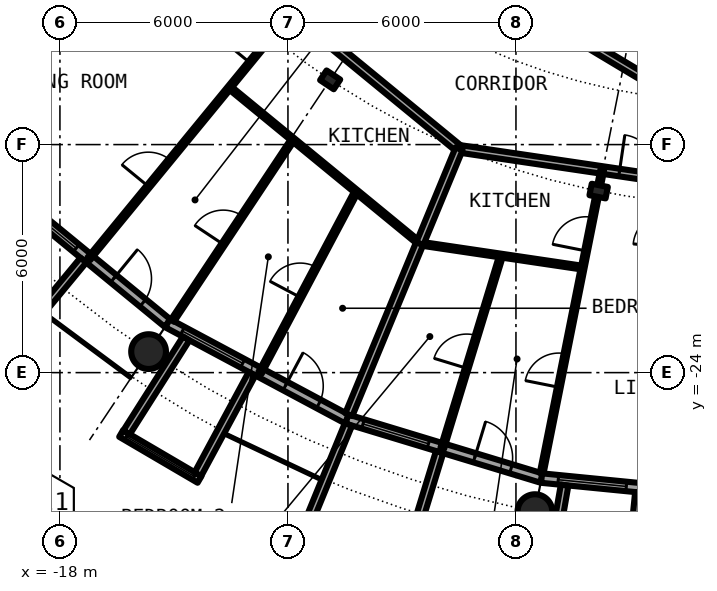
"""IFC4 building model, lengths in metres.
Left out: names, types, materials, properties, quantities, classifications, styles, units other than length and angle.
Written with IfcOpenShell. Run it as: python <this file> out.ifc"""

import sys

from ifc_helpers import new_model, si_unit, direction, frame, frame_2d, origin, origin_2d, place, context, subcontext, project, spatial, rectangle, circle, hollow_circle, i_section, extrude, element, fill, save


model = new_model("IFC4")
c1 = context("Model", 3, precision=1e-05, world=origin(), true_north=direction((0.0, 1.0)))
c2 = subcontext(c1, "Body", "Model", "MODEL_VIEW")
j1 = project(units=[si_unit("LENGTHUNIT", "METRE"), si_unit("PLANEANGLEUNIT", "RADIAN")], contexts=[c1])
p1 = place(None, origin())
s1 = spatial("IfcSite", under=j1, at=p1, CompositionType="ELEMENT")
p2 = place(p1, origin())
s2 = spatial("IfcBuilding", under=s1, at=p2, CompositionType="ELEMENT")
p3 = place(p2, frame((0.0, 0.0, 129.95)))
s3 = spatial("IfcBuildingStorey", under=s2, at=p3, CompositionType="ELEMENT", Elevation=129.95)
for number, where, z_axis, x_axis in (
    (1, (-15.667, -23.448, 0.0), (0.0, 0.0, 1.0), (1.0, 0.0, 0.0)),
    (2, (-5.501, -27.658, 0.0), (0.0, 0.0, 1.0), (1.0, 0.0, 0.0)),
):
    element("IfcColumn", number, at=place(p3, frame(where, z_axis=z_axis, x_axis=x_axis)), inside=s3, PredefinedType="COLUMN", context=c2, shape_type="SweptSolid", body=[
        extrude(hollow_circle(Radius=0.457, WallThickness=0.04, at=origin_2d()), origin(), (0.0, 0.0, 1.0), 3.05),
    ])
for number, where, z_axis, x_axis in (
    (3, (-10.889, -16.297, 0.0), (0.0, 0.0, 1.0), (-0.556, -0.831, 0.0)),
    (4, (-3.824, -19.223, 0.0), (0.0, 0.0, 1.0), (-0.195, -0.981, 0.0)),
):
    element("IfcColumn", number, at=place(p3, frame(where, z_axis=z_axis, x_axis=x_axis)), inside=s3, PredefinedType="COLUMN", context=c2, shape_type="SweptSolid", body=[
        extrude(i_section(OverallWidth=0.307, OverallDepth=0.432, WebThickness=0.021, FlangeThickness=0.04, FilletRadius=0.027, at=origin_2d()), origin(), (0.0, 0.0, 1.0), 3.05),
    ])
p4 = place(p3, frame((-19.304, -19.304, 0.0), z_axis=(0.0, 0.0, 1.0), x_axis=(0.773019449054, -0.634382322723, 0.0)))
e5 = element("IfcWall", 5, at=p4, inside=s3, PredefinedType="SOLIDWALL", context=c2, shape_type="SweptSolid", body=[
    extrude(rectangle(XDim=5.352, YDim=0.25, at=frame_2d((2.676, 0.0))), origin(), (0.0, 0.0, 1.0), 2.7),
])
p5 = place(p4, frame((0.441, 0.0, 0.3)))
e6 = element("IfcOpeningElement", 6, at=p5, cuts=e5, PredefinedType="OPENING", context=c2, shape_type="SweptSolid", body=[
    extrude(rectangle(XDim=1.8, YDim=2.1, at=frame_2d((0.9, 1.05))), frame((0.0, 0.135, 0.0), z_axis=(0.0, -1.0, 0.0), x_axis=(1.0, 0.0, 0.0)), (0.0, 0.0, 1.0), 0.27),
])
p6 = place(p4, frame((3.51, 0.0, 0.0)))
e7 = element("IfcOpeningElement", 7, at=p6, cuts=e5, PredefinedType="OPENING", context=c2, shape_type="SweptSolid", body=[
    extrude(rectangle(XDim=1.0, YDim=2.2, at=frame_2d((0.5, 1.1))), frame((0.0, 0.135, 0.0), z_axis=(0.0, -1.0, 0.0), x_axis=(1.0, 0.0, 0.0)), (0.0, 0.0, 1.0), 0.27),
])
p7 = place(p3, frame((-17.384, -21.041, -0.03), z_axis=(0.0, 0.0, 1.0), x_axis=(-0.63709551667, -0.770784861449, 0.0)))
e8 = element("IfcWall", 8, at=p7, inside=s3, PredefinedType="SOLIDWALL", context=c2, shape_type="SweptSolid", body=[
    extrude(rectangle(XDim=3.006, YDim=0.2, at=frame_2d((1.503, 0.0))), origin(), (0.0, 0.0, 1.0), 2.73),
])
p8 = place(p3, frame((-15.167, -22.699, 0.0), z_axis=(0.0, 0.0, 1.0), x_axis=(0.881915646801, -0.471407246368, 0.0)))
e9 = element("IfcWall", 9, at=p8, inside=s3, PredefinedType="SOLIDWALL", context=c2, shape_type="SweptSolid", body=[
    extrude(rectangle(XDim=5.352, YDim=0.25, at=frame_2d((2.676, 0.0))), origin(), (0.0, 0.0, 1.0), 2.7),
])
p9 = place(p8, frame((0.441, 0.0, 0.3)))
e10 = element("IfcOpeningElement", 10, at=p9, cuts=e9, PredefinedType="OPENING", context=c2, shape_type="SweptSolid", body=[
    extrude(rectangle(XDim=1.8, YDim=2.1, at=frame_2d((0.9, 1.05))), frame((0.0, 0.135, 0.0), z_axis=(0.0, -1.0, 0.0), x_axis=(1.0, 0.0, 0.0)), (0.0, 0.0, 1.0), 0.27),
])
p10 = place(p8, frame((3.51, 0.0, 0.0)))
e11 = element("IfcOpeningElement", 11, at=p10, cuts=e9, PredefinedType="OPENING", context=c2, shape_type="SweptSolid", body=[
    extrude(rectangle(XDim=1.0, YDim=2.2, at=frame_2d((0.5, 1.1))), frame((0.0, 0.135, 0.0), z_axis=(0.0, -1.0, 0.0), x_axis=(1.0, 0.0, 0.0)), (0.0, 0.0, 1.0), 0.27),
])
p11 = place(p3, frame((-16.39, -25.603, -0.03), z_axis=(0.0, 0.0, 1.0), x_axis=(0.862762477128, -0.505609442218, 0.0)))
e12 = element("IfcWall", 12, at=p11, inside=s3, PredefinedType="SOLIDWALL", context=c2, shape_type="SweptSolid", body=[
    extrude(rectangle(XDim=2.391, YDim=0.2, at=frame_2d((1.196, 0.0))), origin(), (0.0, 0.0, 1.0), 2.73),
])
p12 = place(p11, frame((0.156, 0.0, 0.33)))
e13 = element("IfcOpeningElement", 13, at=p12, cuts=e12, PredefinedType="OPENING", context=c2, shape_type="SweptSolid", body=[
    extrude(circle(Radius=1.04, at=frame_2d((1.04, 1.04))), frame((0.0, 0.11, 0.0), z_axis=(0.0, -1.0, 0.0), x_axis=(1.0, 0.0, 0.0)), (0.0, 0.0, 1.0), 0.22),
])
p13 = place(p3, frame((-14.678, -23.102, -0.03), z_axis=(0.0, 0.0, 1.0), x_axis=(-0.536001536573, -0.844217005746, 0.0)))
e14 = element("IfcWall", 14, at=p13, inside=s3, PredefinedType="SOLIDWALL", context=c2, shape_type="SweptSolid", body=[
    extrude(rectangle(XDim=2.929, YDim=0.2, at=frame_2d((1.465, 0.0))), origin(), (0.0, 0.0, 1.0), 2.73),
])
p14 = place(p3, frame((-12.945, -24.029, -0.03), z_axis=(0.0, 0.0, 1.0), x_axis=(-0.474424310775, -0.88029629861, 0.0)))
e15 = element("IfcWall", 15, at=p14, inside=s3, PredefinedType="SOLIDWALL", context=c2, shape_type="SweptSolid", body=[
    extrude(rectangle(XDim=3.006, YDim=0.2, at=frame_2d((1.503, 0.0))), origin(), (0.0, 0.0, 1.0), 2.73),
])
p15 = place(p3, frame((-10.447, -25.222, 0.0), z_axis=(0.0, 0.0, 1.0), x_axis=(0.956965678721, -0.290201119486, 0.0)))
e16 = element("IfcWall", 16, at=p15, inside=s3, PredefinedType="SOLIDWALL", context=c2, shape_type="SweptSolid", body=[
    extrude(rectangle(XDim=5.351, YDim=0.25, at=frame_2d((2.676, 0.0))), origin(), (0.0, 0.0, 1.0), 2.7),
])
p16 = place(p15, frame((0.441, 0.0, 0.3)))
e17 = element("IfcOpeningElement", 17, at=p16, cuts=e16, PredefinedType="OPENING", context=c2, shape_type="SweptSolid", body=[
    extrude(rectangle(XDim=1.8, YDim=2.1, at=frame_2d((0.9, 1.05))), frame((0.0, 0.135, 0.0), z_axis=(0.0, -1.0, 0.0), x_axis=(1.0, 0.0, 0.0)), (0.0, 0.0, 1.0), 0.27),
])
p17 = place(p15, frame((3.51, 0.0, 0.0)))
e18 = element("IfcOpeningElement", 18, at=p17, cuts=e16, PredefinedType="OPENING", context=c2, shape_type="SweptSolid", body=[
    extrude(rectangle(XDim=1.0, YDim=2.2, at=frame_2d((0.5, 1.1))), frame((0.0, 0.135, 0.0), z_axis=(0.0, -1.0, 0.0), x_axis=(1.0, 0.0, 0.0)), (0.0, 0.0, 1.0), 0.27),
])
p18 = place(p3, frame((-10.409, -25.364, -0.03), z_axis=(0.0, 0.0, 1.0), x_axis=(-0.379509886562, -0.925187681501, 0.0)))
e19 = element("IfcWall", 19, at=p18, inside=s3, PredefinedType="SOLIDWALL", context=c2, shape_type="SweptSolid", body=[
    extrude(rectangle(XDim=2.883, YDim=0.2, at=frame_2d((1.441, 0.0))), origin(), (0.0, 0.0, 1.0), 2.73),
])
p19 = place(p3, frame((-8.009, -26.092, -0.03), z_axis=(0.0, 0.0, 1.0), x_axis=(-0.293406695073, -0.955987715029, 0.0)))
e20 = element("IfcWall", 20, at=p19, inside=s3, PredefinedType="SOLIDWALL", context=c2, shape_type="SweptSolid", body=[
    extrude(rectangle(XDim=3.006, YDim=0.2, at=frame_2d((1.503, 0.0))), origin(), (0.0, 0.0, 1.0), 2.73),
])
p20 = place(p3, frame((-5.326, -26.775, 0.0), z_axis=(0.0, 0.0, 1.0), x_axis=(0.995173996315, -0.098126026407, 0.0)))
e21 = element("IfcWall", 21, at=p20, inside=s3, PredefinedType="SOLIDWALL", context=c2, shape_type="SweptSolid", body=[
    extrude(rectangle(XDim=5.352, YDim=0.25, at=frame_2d((2.676, 0.0))), origin(), (0.0, 0.0, 1.0), 2.7),
])
p21 = place(p20, frame((0.441, 0.0, 0.3)))
e22 = element("IfcOpeningElement", 22, at=p21, cuts=e21, PredefinedType="OPENING", context=c2, shape_type="SweptSolid", body=[
    extrude(rectangle(XDim=1.8, YDim=2.1, at=frame_2d((0.9, 1.05))), frame((0.0, 0.135, 0.0), z_axis=(0.0, -1.0, 0.0), x_axis=(1.0, 0.0, 0.0)), (0.0, 0.0, 1.0), 0.27),
])
p22 = place(p20, frame((3.51, 0.0, 0.0)))
e23 = element("IfcOpeningElement", 23, at=p22, cuts=e21, PredefinedType="OPENING", context=c2, shape_type="SweptSolid", body=[
    extrude(rectangle(XDim=1.0, YDim=2.2, at=frame_2d((0.5, 1.1))), frame((0.0, 0.135, 0.0), z_axis=(0.0, -1.0, 0.0), x_axis=(1.0, 0.0, 0.0)), (0.0, 0.0, 1.0), 0.27),
])
p23 = place(p3, frame((-4.72, -26.961, -0.03), z_axis=(0.0, 0.0, 1.0), x_axis=(-0.172463232037, -0.98501595601, 0.0)))
e24 = element("IfcWall", 24, at=p23, inside=s3, PredefinedType="SOLIDWALL", context=c2, shape_type="SweptSolid", body=[
    extrude(rectangle(XDim=2.929, YDim=0.2, at=frame_2d((1.464, 0.0))), origin(), (0.0, 0.0, 1.0), 2.73),
])
p24 = place(p3, frame((-2.764, -27.153, -0.03), z_axis=(0.0, 0.0, 1.0), x_axis=(-0.101505487237, -0.994834979311, 0.0)))
e25 = element("IfcWall", 25, at=p24, inside=s3, PredefinedType="SOLIDWALL", context=c2, shape_type="SweptSolid", body=[
    extrude(rectangle(XDim=3.007, YDim=0.2, at=frame_2d((1.503, 0.0))), origin(), (0.0, 0.0, 1.0), 2.73),
])
p25 = place(p3, frame((-8.534, -20.603, 0.0), z_axis=(0.0, 0.0, 1.0), x_axis=(0.989178348771, -0.146718077695, 0.0)))
e26 = element("IfcWall", 26, at=p25, inside=s3, PredefinedType="PARTITIONING", context=c2, shape_type="SweptSolid", body=[
    extrude(rectangle(XDim=4.335, YDim=0.1, at=frame_2d((2.167, 0.0))), origin(), (0.0, 0.0, 1.0), 2.7),
])
p26 = place(p3, frame((-13.538, -16.496, 0.0), z_axis=(0.0, 0.0, 1.0), x_axis=(0.773000340237, -0.634405606843, 0.0)))
e27 = element("IfcWall", 27, at=p26, inside=s3, PredefinedType="PARTITIONING", context=c2, shape_type="SweptSolid", body=[
    extrude(rectangle(XDim=6.474, YDim=0.1, at=frame_2d((3.237, 0.0))), origin(), (0.0, 0.0, 1.0), 2.7),
])
p27 = place(p3, frame((-7.495, -18.111, 0.0), z_axis=(0.0, 0.0, 1.0), x_axis=(0.989215286911, -0.146468823102, 0.0)))
e28 = element("IfcWall", 28, at=p27, inside=s3, PredefinedType="PARTITIONING", context=c2, shape_type="SweptSolid", body=[
    extrude(rectangle(XDim=9.531, YDim=0.2, at=frame_2d((4.766, 0.0))), origin(), (0.0, 0.0, 1.0), 2.39),
])
p28 = place(p27, frame((4.26, 0.0, 0.0)))
e29 = element("IfcOpeningElement", 29, at=p28, cuts=e28, PredefinedType="OPENING", context=c2, shape_type="SweptSolid", body=[
    extrude(rectangle(XDim=1.0, YDim=2.3, at=frame_2d((0.5, 1.15))), frame((0.0, 0.11, 0.0), z_axis=(0.0, -1.0, 0.0), x_axis=(1.0, 0.0, 0.0)), (0.0, 0.0, 1.0), 0.22),
])
p29 = place(p3, frame((-16.173, -10.991, 0.0), z_axis=(0.0, 0.0, 1.0), x_axis=(0.773013989296, -0.634388975591, 0.0)))
e30 = element("IfcWall", 30, at=p29, inside=s3, PredefinedType="PARTITIONING", context=c2, shape_type="SweptSolid", body=[
    extrude(rectangle(XDim=11.219, YDim=0.2, at=frame_2d((5.609, 0.0))), origin(), (0.0, 0.0, 1.0), 2.39),
])
p30 = place(p29, frame((4.089, 0.0, 0.0)))
e31 = element("IfcOpeningElement", 31, at=p30, cuts=e30, PredefinedType="OPENING", context=c2, shape_type="SweptSolid", body=[
    extrude(rectangle(XDim=1.0, YDim=2.3, at=frame_2d((0.5, 1.15))), frame((0.0, 0.11, 0.0), z_axis=(0.0, -1.0, 0.0), x_axis=(1.0, 0.0, 0.0)), (0.0, 0.0, 1.0), 0.22),
])
p31 = place(p3, frame((-12.674, -10.216, 0.0), z_axis=(0.0, 0.0, 1.0), x_axis=(0.857761135463, -0.514048474844, 0.0)))
e32 = element("IfcWall", 32, at=p31, inside=s3, PredefinedType="PARTITIONING", context=c2, shape_type="SweptSolid", body=[
    extrude(rectangle(XDim=12.845, YDim=0.2, at=frame_2d((6.423, 0.0))), origin(), (0.0, 0.0, 1.0), 2.7),
])
p32 = place(p31, frame((7.527, 0.0, 0.0)))
e33 = element("IfcOpeningElement", 33, at=p32, cuts=e32, PredefinedType="OPENING", context=c2, shape_type="SweptSolid", body=[
    extrude(rectangle(XDim=1.0, YDim=2.3, at=frame_2d((0.5, 1.15))), frame((0.0, 0.11, 0.0), z_axis=(0.0, -1.0, 0.0), x_axis=(1.0, 0.0, 0.0)), (0.0, 0.0, 1.0), 0.22),
])
p33 = place(p3, frame((-17.24, -21.007, 0.0), z_axis=(0.0, 0.0, 1.0), x_axis=(0.634396151441, 0.77300810024, 0.0)))
e34 = element("IfcWall", 34, at=p33, inside=s3, PredefinedType="PARTITIONING", context=c2, shape_type="SweptSolid", body=[
    extrude(rectangle(XDim=8.419, YDim=0.1, at=frame_2d((4.209, 0.0))), origin(), (0.0, 0.0, 1.0), 2.7),
])
p34 = place(p33, frame((6.679, 0.0, 0.0)))
e35 = element("IfcOpeningElement", 35, at=p34, cuts=e34, PredefinedType="OPENING", context=c2, shape_type="SweptSolid", body=[
    extrude(rectangle(XDim=0.9, YDim=2.3, at=frame_2d((0.45, 1.15))), frame((0.0, 0.06, 0.0), z_axis=(0.0, -1.0, 0.0), x_axis=(1.0, 0.0, 0.0)), (0.0, 0.0, 1.0), 0.12),
])
p35 = place(p33, frame((2.468, 0.0, 0.0)))
e36 = element("IfcOpeningElement", 36, at=p35, cuts=e34, PredefinedType="OPENING", context=c2, shape_type="SweptSolid", body=[
    extrude(rectangle(XDim=0.9, YDim=2.3, at=frame_2d((0.45, 1.15))), frame((0.0, 0.06, 0.0), z_axis=(0.0, -1.0, 0.0), x_axis=(1.0, 0.0, 0.0)), (0.0, 0.0, 1.0), 0.12),
])
p36 = place(p3, frame((-15.039, -22.634, 0.0), z_axis=(0.0, 0.0, 1.0), x_axis=(0.553440102418, 0.832888980018, 0.0)))
e37 = element("IfcWall", 37, at=p36, inside=s3, PredefinedType="PARTITIONING", context=c2, shape_type="SweptSolid", body=[
    extrude(rectangle(XDim=5.726, YDim=0.1, at=frame_2d((2.863, 0.0))), origin(), (0.0, 0.0, 1.0), 2.7),
])
p37 = place(p36, frame((2.413, 0.0, 0.0)))
e38 = element("IfcOpeningElement", 38, at=p37, cuts=e37, PredefinedType="OPENING", context=c2, shape_type="SweptSolid", body=[
    extrude(rectangle(XDim=0.9, YDim=2.3, at=frame_2d((0.45, 1.15))), frame((0.0, 0.06, 0.0), z_axis=(0.0, -1.0, 0.0), x_axis=(1.0, 0.0, 0.0)), (0.0, 0.0, 1.0), 0.12),
])
p38 = place(p3, frame((-12.734, -24.007, 0.0), z_axis=(0.0, 0.0, 1.0), x_axis=(0.468610030042, 0.883405139075, 0.0)))
e39 = element("IfcWall", 39, at=p38, inside=s3, PredefinedType="PARTITIONING", context=c2, shape_type="SweptSolid", body=[
    extrude(rectangle(XDim=5.403, YDim=0.1, at=frame_2d((2.702, 0.0))), origin(), (0.0, 0.0, 1.0), 2.7),
])
p39 = place(p38, frame((2.252, 0.0, 0.0)))
e40 = element("IfcOpeningElement", 40, at=p39, cuts=e39, PredefinedType="OPENING", context=c2, shape_type="SweptSolid", body=[
    extrude(rectangle(XDim=0.9, YDim=2.3, at=frame_2d((0.45, 1.15))), frame((0.0, 0.06, 0.0), z_axis=(0.0, -1.0, 0.0), x_axis=(1.0, 0.0, 0.0)), (0.0, 0.0, 1.0), 0.12),
])
p40 = place(p3, frame((-10.399, -25.106, 0.0), z_axis=(0.0, 0.0, 1.0), x_axis=(0.382651153718, 0.923892902104, 0.0)))
e41 = element("IfcWall", 41, at=p40, inside=s3, PredefinedType="PARTITIONING", context=c2, shape_type="SweptSolid", body=[
    extrude(rectangle(XDim=4.874, YDim=0.2, at=frame_2d((2.437, 0.0))), origin(), (0.0, 0.0, 1.0), 2.7),
])
p41 = place(p3, frame((-8.529, -20.605, 0.0), z_axis=(0.0, 0.0, 1.0), x_axis=(0.382540781694, 0.923938607452, 0.0)))
e42 = element("IfcWall", 42, at=p41, inside=s3, PredefinedType="PARTITIONING", context=c2, shape_type="SweptSolid", body=[
    extrude(rectangle(XDim=2.7, YDim=0.2, at=frame_2d((1.35, 0.0))), origin(), (0.0, 0.0, 1.0), 2.7),
])
p42 = place(p3, frame((-7.938, -25.99, 0.0), z_axis=(0.0, 0.0, 1.0), x_axis=(0.292081613207, 0.956393397732, 0.0)))
e43 = element("IfcWall", 43, at=p42, inside=s3, PredefinedType="PARTITIONING", context=c2, shape_type="SweptSolid", body=[
    extrude(rectangle(XDim=5.3, YDim=0.1, at=frame_2d((2.65, 0.0))), origin(), (0.0, 0.0, 1.0), 2.7),
])
p43 = place(p42, frame((2.2, 0.0, 0.0)))
e44 = element("IfcOpeningElement", 44, at=p43, cuts=e43, PredefinedType="OPENING", context=c2, shape_type="SweptSolid", body=[
    extrude(rectangle(XDim=0.9, YDim=2.3, at=frame_2d((0.45, 1.15))), frame((0.0, 0.06, 0.0), z_axis=(0.0, -1.0, 0.0), x_axis=(1.0, 0.0, 0.0)), (0.0, 0.0, 1.0), 0.12),
])
p44 = place(p3, frame((-5.324, -26.649, 0.0), z_axis=(0.0, 0.0, 1.0), x_axis=(0.195918370415, 0.980620207896, 0.0)))
e45 = element("IfcWall", 45, at=p44, inside=s3, PredefinedType="PARTITIONING", context=c2, shape_type="SweptSolid", body=[
    extrude(rectangle(XDim=7.36, YDim=0.1, at=frame_2d((3.68, 0.0))), origin(), (0.0, 0.0, 1.0), 2.7),
])
p45 = place(p44, frame((5.966, 0.0, 0.0)))
e46 = element("IfcOpeningElement", 46, at=p45, cuts=e45, PredefinedType="OPENING", context=c2, shape_type="SweptSolid", body=[
    extrude(rectangle(XDim=0.9, YDim=2.3, at=frame_2d((0.45, 1.15))), frame((0.0, 0.06, 0.0), z_axis=(0.0, -1.0, 0.0), x_axis=(1.0, 0.0, 0.0)), (0.0, 0.0, 1.0), 0.12),
])
p46 = place(p44, frame((2.308, 0.0, 0.0)))
e47 = element("IfcOpeningElement", 47, at=p46, cuts=e45, PredefinedType="OPENING", context=c2, shape_type="SweptSolid", body=[
    extrude(rectangle(XDim=0.9, YDim=2.3, at=frame_2d((0.45, 1.15))), frame((0.0, 0.06, 0.0), z_axis=(0.0, -1.0, 0.0), x_axis=(1.0, 0.0, 0.0)), (0.0, 0.0, 1.0), 0.12),
])
p47 = place(p3, frame((-3.797, -19.008, 0.0), z_axis=(0.0, 0.0, 1.0), x_axis=(0.196386856719, 0.980526492507, 0.0)))
e48 = element("IfcWall", 48, at=p47, inside=s3, PredefinedType="PARTITIONING", context=c2, shape_type="SweptSolid", body=[
    extrude(rectangle(XDim=0.347, YDim=0.1, at=frame_2d((0.173, 0.0))), origin(), (0.0, 0.0, 1.0), 2.7),
])
p48 = place(p5, origin())
e49 = element("IfcWindow", 49, at=p48, inside=s3, PartitioningType="SINGLE_PANEL", PredefinedType="WINDOW", context=c2, shape_type="SweptSolid", body=[
    extrude(rectangle(XDim=1.8, YDim=2.1, at=frame_2d((0.9, 1.05))), frame((0.0, 0.03, 0.0), z_axis=(0.0, -1.0, 0.0), x_axis=(1.0, 0.0, 0.0)), (0.0, 0.0, 1.0), 0.06),
])
fill(e6, e49)
p49 = place(p6, origin())
e50 = element("IfcDoor", 50, at=p49, inside=s3, OperationType="SINGLE_SWING_LEFT", PredefinedType="DOOR", context=c2, shape_type="SweptSolid", body=[
    extrude(rectangle(XDim=1.0, YDim=2.2, at=frame_2d((0.5, 1.1))), frame((0.0, 0.025, 0.0), z_axis=(0.0, -1.0, 0.0), x_axis=(1.0, 0.0, 0.0)), (0.0, 0.0, 1.0), 0.05),
])
fill(e7, e50)
p50 = place(p9, origin())
e51 = element("IfcWindow", 51, at=p50, inside=s3, PartitioningType="SINGLE_PANEL", PredefinedType="WINDOW", context=c2, shape_type="SweptSolid", body=[
    extrude(rectangle(XDim=1.8, YDim=2.1, at=frame_2d((0.9, 1.05))), frame((0.0, 0.03, 0.0), z_axis=(0.0, -1.0, 0.0), x_axis=(1.0, 0.0, 0.0)), (0.0, 0.0, 1.0), 0.06),
])
fill(e10, e51)
p51 = place(p12, origin())
e52 = element("IfcWindow", 52, at=p51, inside=s3, PartitioningType="SINGLE_PANEL", PredefinedType="WINDOW", context=c2, shape_type="SweptSolid", body=[
    extrude(circle(Radius=1.04, at=frame_2d((1.04, 1.04))), frame((0.0, 0.03, 0.0), z_axis=(0.0, -1.0, 0.0), x_axis=(1.0, 0.0, 0.0)), (0.0, 0.0, 1.0), 0.06),
])
fill(e13, e52)
p52 = place(p10, origin())
e53 = element("IfcDoor", 53, at=p52, inside=s3, OperationType="SINGLE_SWING_LEFT", PredefinedType="DOOR", context=c2, shape_type="SweptSolid", body=[
    extrude(rectangle(XDim=1.0, YDim=2.2, at=frame_2d((0.5, 1.1))), frame((0.0, 0.025, 0.0), z_axis=(0.0, -1.0, 0.0), x_axis=(1.0, 0.0, 0.0)), (0.0, 0.0, 1.0), 0.05),
])
fill(e11, e53)
p53 = place(p16, origin())
e54 = element("IfcWindow", 54, at=p53, inside=s3, PartitioningType="SINGLE_PANEL", PredefinedType="WINDOW", context=c2, shape_type="SweptSolid", body=[
    extrude(rectangle(XDim=1.8, YDim=2.1, at=frame_2d((0.9, 1.05))), frame((0.0, 0.03, 0.0), z_axis=(0.0, -1.0, 0.0), x_axis=(1.0, 0.0, 0.0)), (0.0, 0.0, 1.0), 0.06),
])
fill(e17, e54)
p54 = place(p17, origin())
e55 = element("IfcDoor", 55, at=p54, inside=s3, OperationType="SINGLE_SWING_LEFT", PredefinedType="DOOR", context=c2, shape_type="SweptSolid", body=[
    extrude(rectangle(XDim=1.0, YDim=2.2, at=frame_2d((0.5, 1.1))), frame((0.0, 0.025, 0.0), z_axis=(0.0, -1.0, 0.0), x_axis=(1.0, 0.0, 0.0)), (0.0, 0.0, 1.0), 0.05),
])
fill(e18, e55)
p55 = place(p21, origin())
e56 = element("IfcWindow", 56, at=p55, inside=s3, PartitioningType="SINGLE_PANEL", PredefinedType="WINDOW", context=c2, shape_type="SweptSolid", body=[
    extrude(rectangle(XDim=1.8, YDim=2.1, at=frame_2d((0.9, 1.05))), frame((0.0, 0.03, 0.0), z_axis=(0.0, -1.0, 0.0), x_axis=(1.0, 0.0, 0.0)), (0.0, 0.0, 1.0), 0.06),
])
fill(e22, e56)
p56 = place(p34, origin())
e57 = element("IfcDoor", 57, at=p56, inside=s3, OperationType="SINGLE_SWING_RIGHT", PredefinedType="DOOR", context=c2, shape_type="SweptSolid", body=[
    extrude(rectangle(XDim=0.9, YDim=2.3, at=frame_2d((0.45, 1.15))), frame((0.0, 0.025, 0.0), z_axis=(0.0, -1.0, 0.0), x_axis=(1.0, 0.0, 0.0)), (0.0, 0.0, 1.0), 0.05),
])
fill(e35, e57)
p57 = place(p35, origin())
e58 = element("IfcDoor", 58, at=p57, inside=s3, OperationType="SINGLE_SWING_LEFT", PredefinedType="DOOR", context=c2, shape_type="SweptSolid", body=[
    extrude(rectangle(XDim=0.9, YDim=2.3, at=frame_2d((0.45, 1.15))), frame((0.0, 0.025, 0.0), z_axis=(0.0, -1.0, 0.0), x_axis=(1.0, 0.0, 0.0)), (0.0, 0.0, 1.0), 0.05),
])
fill(e36, e58)
p58 = place(p37, origin())
e59 = element("IfcDoor", 59, at=p58, inside=s3, OperationType="SINGLE_SWING_RIGHT", PredefinedType="DOOR", context=c2, shape_type="SweptSolid", body=[
    extrude(rectangle(XDim=0.9, YDim=2.3, at=frame_2d((0.45, 1.15))), frame((0.0, 0.025, 0.0), z_axis=(0.0, -1.0, 0.0), x_axis=(1.0, 0.0, 0.0)), (0.0, 0.0, 1.0), 0.05),
])
fill(e38, e59)
p59 = place(p39, origin())
e60 = element("IfcDoor", 60, at=p59, inside=s3, OperationType="SINGLE_SWING_LEFT", PredefinedType="DOOR", context=c2, shape_type="SweptSolid", body=[
    extrude(rectangle(XDim=0.9, YDim=2.3, at=frame_2d((0.45, 1.15))), frame((0.0, 0.025, 0.0), z_axis=(0.0, -1.0, 0.0), x_axis=(1.0, 0.0, 0.0)), (0.0, 0.0, 1.0), 0.05),
])
fill(e40, e60)
p60 = place(p28, origin())
e61 = element("IfcDoor", 61, at=p60, inside=s3, OperationType="SINGLE_SWING_LEFT", PredefinedType="DOOR", context=c2, shape_type="SweptSolid", body=[
    extrude(rectangle(XDim=1.0, YDim=2.3, at=frame_2d((0.5, 1.15))), frame((0.0, 0.025, 0.0), z_axis=(0.0, -1.0, 0.0), x_axis=(1.0, 0.0, 0.0)), (0.0, 0.0, 1.0), 0.05),
])
fill(e29, e61)
p61 = place(p45, origin())
e62 = element("IfcDoor", 62, at=p61, inside=s3, OperationType="SINGLE_SWING_RIGHT", PredefinedType="DOOR", context=c2, shape_type="SweptSolid", body=[
    extrude(rectangle(XDim=0.9, YDim=2.3, at=frame_2d((0.45, 1.15))), frame((0.0, 0.025, 0.0), z_axis=(0.0, -1.0, 0.0), x_axis=(1.0, 0.0, 0.0)), (0.0, 0.0, 1.0), 0.05),
])
fill(e46, e62)
p62 = place(p46, origin())
e63 = element("IfcDoor", 63, at=p62, inside=s3, OperationType="SINGLE_SWING_LEFT", PredefinedType="DOOR", context=c2, shape_type="SweptSolid", body=[
    extrude(rectangle(XDim=0.9, YDim=2.3, at=frame_2d((0.45, 1.15))), frame((0.0, 0.025, 0.0), z_axis=(0.0, -1.0, 0.0), x_axis=(1.0, 0.0, 0.0)), (0.0, 0.0, 1.0), 0.05),
])
fill(e47, e63)
p63 = place(p43, origin())
e64 = element("IfcDoor", 64, at=p63, inside=s3, OperationType="SINGLE_SWING_RIGHT", PredefinedType="DOOR", context=c2, shape_type="SweptSolid", body=[
    extrude(rectangle(XDim=0.9, YDim=2.3, at=frame_2d((0.45, 1.15))), frame((0.0, 0.025, 0.0), z_axis=(0.0, -1.0, 0.0), x_axis=(1.0, 0.0, 0.0)), (0.0, 0.0, 1.0), 0.05),
])
fill(e44, e64)
save(model, sys.argv[1])
